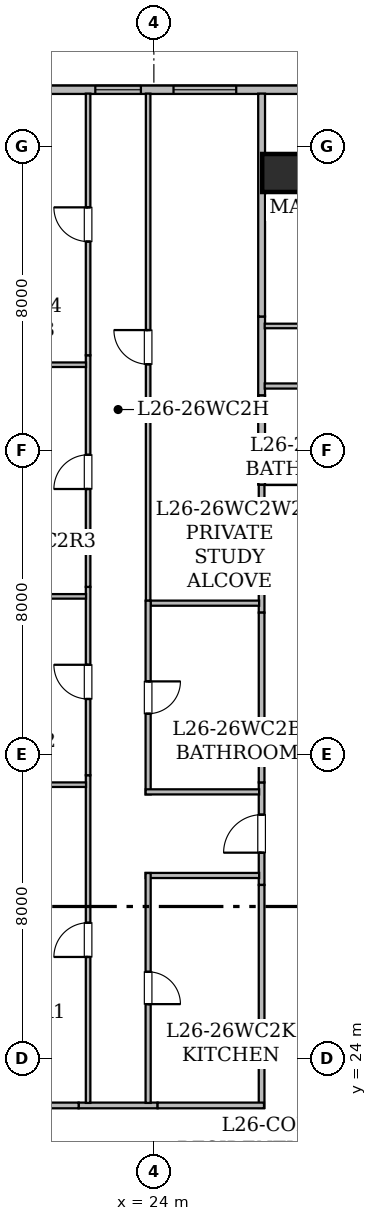
"""IFC4 building model, lengths in metres.
Left out: names, types, materials, properties, quantities, classifications, styles, units other than length and angle.
Written with IfcOpenShell. Run it as: python <this file> out.ifc"""

import sys

from ifc_helpers import new_model, si_unit, direction, frame, frame_2d, origin, origin_2d, place, context, subcontext, project, spatial, rectangle, hollow_rectangle, extrude, element, fill, save


model = new_model("IFC4")
c1 = context("Model", 3, precision=1e-05, world=origin(), true_north=direction((0.0, 1.0)))
c2 = subcontext(c1, "Body", "Model", "MODEL_VIEW")
j1 = project(units=[si_unit("LENGTHUNIT", "METRE"), si_unit("PLANEANGLEUNIT", "RADIAN")], contexts=[c1])
p1 = place(None, origin())
s1 = spatial("IfcSite", under=j1, at=p1, CompositionType="ELEMENT")
p2 = place(p1, origin())
s2 = spatial("IfcBuilding", under=s1, at=p2, CompositionType="ELEMENT")
p3 = place(p2, frame((0.0, 0.0, 105.55)))
s3 = spatial("IfcBuildingStorey", under=s2, at=p3, CompositionType="ELEMENT", Elevation=105.55)
p4 = place(p3, frame((27.35, 47.3, 0.0), z_axis=(0.0, 0.0, 1.0), x_axis=(1.0, 0.0, 0.0)))
e1 = element("IfcColumn", 1, at=p4, inside=s3, PredefinedType="COLUMN", context=c2, shape_type="SweptSolid", body=[
    extrude(hollow_rectangle(XDim=1.0, YDim=1.0, WallThickness=0.05, at=origin_2d()), origin(), (0.0, 0.0, 1.0), 3.65),
])
p5 = place(p3, frame((13.715, 49.49, 0.0), z_axis=(0.0, 0.0, 1.0), x_axis=(1.0, 0.0, 0.0)))
e2 = element("IfcWall", 2, at=p5, inside=s3, PredefinedType="STANDARD", context=c2, shape_type="SweptSolid", body=[
    extrude(rectangle(XDim=38.639, YDim=0.22, at=frame_2d((19.319, 0.0))), origin(), (0.0, 0.0, 1.0), 3.43),
])
p6 = place(p5, frame((1.435, 0.0, 0.85)))
e3 = element("IfcOpeningElement", 3, at=p6, cuts=e2, PredefinedType="OPENING", context=c2, shape_type="SweptSolid", body=[
    extrude(rectangle(XDim=1.65, YDim=1.55, at=frame_2d((0.825, 0.775))), frame((0.0, 0.12, 0.0), z_axis=(0.0, -1.0, 0.0), x_axis=(1.0, 0.0, 0.0)), (0.0, 0.0, 1.0), 0.24),
])
p7 = place(p5, frame((10.802, 0.0, 0.85)))
e4 = element("IfcOpeningElement", 4, at=p7, cuts=e2, PredefinedType="OPENING", context=c2, shape_type="SweptSolid", body=[
    extrude(rectangle(XDim=1.65, YDim=1.55, at=frame_2d((0.825, 0.775))), frame((0.0, 0.12, 0.0), z_axis=(0.0, -1.0, 0.0), x_axis=(1.0, 0.0, 0.0)), (0.0, 0.0, 1.0), 0.24),
])
p8 = place(p5, frame((8.744, 0.0, 0.8)))
e5 = element("IfcOpeningElement", 5, at=p8, cuts=e2, PredefinedType="OPENING", context=c2, shape_type="SweptSolid", body=[
    extrude(rectangle(XDim=1.2, YDim=1.5, at=frame_2d((0.6, 0.75))), frame((0.0, 0.12, 0.0), z_axis=(0.0, -1.0, 0.0), x_axis=(1.0, 0.0, 0.0)), (0.0, 0.0, 1.0), 0.24),
])
p9 = place(p5, frame((5.319, 0.0, 0.85)))
e6 = element("IfcOpeningElement", 6, at=p9, cuts=e2, PredefinedType="OPENING", context=c2, shape_type="SweptSolid", body=[
    extrude(rectangle(XDim=1.65, YDim=1.55, at=frame_2d((0.825, 0.775))), frame((0.0, 0.12, 0.0), z_axis=(0.0, -1.0, 0.0), x_axis=(1.0, 0.0, 0.0)), (0.0, 0.0, 1.0), 0.24),
])
p10 = place(p5, frame((15.665, 0.0, 0.85)))
e7 = element("IfcOpeningElement", 7, at=p10, cuts=e2, PredefinedType="OPENING", context=c2, shape_type="SweptSolid", body=[
    extrude(rectangle(XDim=1.65, YDim=1.55, at=frame_2d((0.825, 0.775))), frame((0.0, 0.12, 0.0), z_axis=(0.0, -1.0, 0.0), x_axis=(1.0, 0.0, 0.0)), (0.0, 0.0, 1.0), 0.24),
])
p11 = place(p5, frame((22.93, 0.0, 0.85)))
e8 = element("IfcOpeningElement", 8, at=p11, cuts=e2, PredefinedType="OPENING", context=c2, shape_type="SweptSolid", body=[
    extrude(rectangle(XDim=1.65, YDim=1.55, at=frame_2d((0.825, 0.775))), frame((0.0, 0.12, 0.0), z_axis=(0.0, -1.0, 0.0), x_axis=(1.0, 0.0, 0.0)), (0.0, 0.0, 1.0), 0.24),
])
p12 = place(p5, frame((30.23, 0.0, 0.85)))
e9 = element("IfcOpeningElement", 9, at=p12, cuts=e2, PredefinedType="OPENING", context=c2, shape_type="SweptSolid", body=[
    extrude(rectangle(XDim=1.65, YDim=1.55, at=frame_2d((0.825, 0.775))), frame((0.0, 0.12, 0.0), z_axis=(0.0, -1.0, 0.0), x_axis=(1.0, 0.0, 0.0)), (0.0, 0.0, 1.0), 0.24),
])
p13 = place(p5, frame((36.367, 0.0, 0.85)))
e10 = element("IfcOpeningElement", 10, at=p13, cuts=e2, PredefinedType="OPENING", context=c2, shape_type="SweptSolid", body=[
    extrude(rectangle(XDim=1.65, YDim=1.55, at=frame_2d((0.825, 0.775))), frame((0.0, 0.12, 0.0), z_axis=(0.0, -1.0, 0.0), x_axis=(1.0, 0.0, 0.0)), (0.0, 0.0, 1.0), 0.24),
])
p14 = place(p3, frame((26.835, 35.732, 0.0), z_axis=(0.0, 0.0, 1.0), x_axis=(0.0, 1.0, 0.0)))
e11 = element("IfcWall", 11, at=p14, inside=s3, PredefinedType="STANDARD", context=c2, shape_type="SweptSolid", body=[
    extrude(rectangle(XDim=3.368, YDim=0.15, at=frame_2d((1.684, 0.0))), origin(), (0.0, 0.0, 1.0), 2.647),
])
p15 = place(p3, frame((26.835, 28.567, 0.0), z_axis=(0.0, 0.0, 1.0), x_axis=(0.0, 1.0, 0.0)))
e12 = element("IfcWall", 12, at=p15, inside=s3, PredefinedType="STANDARD", context=c2, shape_type="SweptSolid", body=[
    extrude(rectangle(XDim=2.698, YDim=0.15, at=frame_2d((1.349, 0.0))), origin(), (0.0, 0.0, 1.0), 3.43),
])
p16 = place(p15, frame((0.849, 0.0, 0.0)))
e13 = element("IfcOpeningElement", 13, at=p16, cuts=e12, PredefinedType="OPENING", context=c2, shape_type="SweptSolid", body=[
    extrude(rectangle(XDim=1.0, YDim=2.15, at=frame_2d((0.5, 1.075))), frame((0.0, 0.085, 0.0), z_axis=(0.0, -1.0, 0.0), x_axis=(1.0, 0.0, 0.0)), (0.0, 0.0, 1.0), 0.17),
])
p17 = place(p3, frame((22.02, 22.765, 0.0), z_axis=(0.0, 0.0, 1.0), x_axis=(1.0, 0.0, 0.0)))
e14 = element("IfcWall", 14, at=p17, inside=s3, PredefinedType="STANDARD", context=c2, shape_type="SweptSolid", body=[
    extrude(rectangle(XDim=2.078, YDim=0.15, at=frame_2d((1.039, 0.0))), origin(), (0.0, 0.0, 1.0), 3.43),
])
p18 = place(p3, frame((26.835, 31.265, 0.0), z_axis=(0.0, 0.0, 1.0), x_axis=(0.0, 1.0, 0.0)))
e15 = element("IfcWall", 15, at=p18, inside=s3, PredefinedType="STANDARD", context=c2, shape_type="SweptSolid", body=[
    extrude(rectangle(XDim=4.467, YDim=0.15, at=frame_2d((2.233, 0.0))), origin(), (0.0, 0.0, 1.0), 3.43),
])
p19 = place(p3, frame((26.835, 22.7, 0.0), z_axis=(0.0, 0.0, 1.0), x_axis=(0.0, 1.0, 0.0)))
e16 = element("IfcWall", 16, at=p19, inside=s3, PredefinedType="STANDARD", context=c2, shape_type="SweptSolid", body=[
    extrude(rectangle(XDim=5.867, YDim=0.15, at=frame_2d((2.934, 0.0))), origin(), (0.0, 0.0, 1.0), 2.961),
])
p20 = place(p3, frame((24.098, 22.765, 0.0), z_axis=(0.0, 0.0, 1.0), x_axis=(1.0, 0.0, 0.0)))
e17 = element("IfcWall", 17, at=p20, inside=s3, PredefinedType="STANDARD", context=c2, shape_type="SweptSolid", body=[
    extrude(rectangle(XDim=2.8, YDim=0.15, at=frame_2d((1.4, 0.0))), origin(), (0.0, 0.0, 1.0), 3.43),
])
p21 = place(p3, frame((17.699, 22.765, 0.0), z_axis=(0.0, 0.0, 1.0), x_axis=(1.0, 0.0, 0.0)))
e18 = element("IfcWall", 18, at=p21, inside=s3, PredefinedType="STANDARD", context=c2, shape_type="SweptSolid", body=[
    extrude(rectangle(XDim=4.321, YDim=0.15, at=frame_2d((2.161, 0.0))), origin(), (0.0, 0.0, 1.0), 2.647),
])
p22 = place(p3, frame((26.9, 39.165, 0.0), z_axis=(0.0, 0.0, 1.0), x_axis=(1.0, 0.0, 0.0)))
e19 = element("IfcWall", 19, at=p22, inside=s3, PredefinedType="STANDARD", context=c2, shape_type="SweptSolid", body=[
    extrude(rectangle(XDim=4.701, YDim=0.15, at=frame_2d((2.351, 0.0))), origin(), (0.0, 0.0, 1.0), 2.647),
])
p23 = place(p3, frame((23.849, 36.046, 0.0), z_axis=(0.0, 0.0, 1.0), x_axis=(0.0, 1.0, 0.0)))
e20 = element("IfcWall", 20, at=p23, inside=s3, PredefinedType="PARTITIONING", context=c2, shape_type="SweptSolid", body=[
    extrude(rectangle(XDim=13.342, YDim=0.12, at=frame_2d((6.671, 0.0))), origin(), (0.0, 0.0, 1.0), 2.647),
])
p24 = place(p23, frame((6.221, 0.0, 0.0)))
e21 = element("IfcOpeningElement", 21, at=p24, cuts=e20, PredefinedType="OPENING", context=c2, shape_type="SweptSolid", body=[
    extrude(rectangle(XDim=0.9, YDim=2.1, at=frame_2d((0.45, 1.05))), frame((0.0, 0.07, 0.0), z_axis=(0.0, -1.0, 0.0), x_axis=(1.0, 0.0, 0.0)), (0.0, 0.0, 1.0), 0.14),
])
p25 = place(p3, frame((26.77, 35.981, 0.0), z_axis=(0.0, 0.0, 1.0), x_axis=(-1.0, 0.0, 0.0)))
e22 = element("IfcWall", 22, at=p25, inside=s3, PredefinedType="PARTITIONING", context=c2, shape_type="SweptSolid", body=[
    extrude(rectangle(XDim=2.856, YDim=0.135, at=frame_2d((1.428, 0.0))), origin(), (0.0, 0.0, 1.0), 3.43),
])
p26 = place(p3, frame((26.835, 43.524, 0.0), z_axis=(0.0, 0.0, 1.0), x_axis=(0.0, -1.0, 0.0)))
e23 = element("IfcWall", 23, at=p26, inside=s3, PredefinedType="STANDARD", context=c2, shape_type="SweptSolid", body=[
    extrude(rectangle(XDim=2.078, YDim=0.18, at=frame_2d((1.039, 0.0))), origin(), (0.0, 0.0, 1.0), 3.43),
])
p27 = place(p3, frame((26.835, 41.446, 0.0), z_axis=(0.0, 0.0, 1.0), x_axis=(0.0, -1.0, 0.0)))
e24 = element("IfcWall", 24, at=p27, inside=s3, PredefinedType="STANDARD", context=c2, shape_type="SweptSolid", body=[
    extrude(rectangle(XDim=2.346, YDim=0.18, at=frame_2d((1.173, 0.0))), origin(), (0.0, 0.0, 1.0), 3.43),
])
p28 = place(p3, frame((26.835, 49.388, 0.0), z_axis=(0.0, 0.0, 1.0), x_axis=(0.0, -1.0, 0.0)))
e25 = element("IfcWall", 25, at=p28, inside=s3, PredefinedType="STANDARD", context=c2, shape_type="SweptSolid", body=[
    extrude(rectangle(XDim=5.864, YDim=0.18, at=frame_2d((2.932, 0.0))), origin(), (0.0, 0.0, 1.0), 2.876),
])
p29 = place(p3, frame((23.849, 36.046, 0.0), z_axis=(0.0, 0.0, 1.0), x_axis=(0.0, -1.0, 0.0)))
e26 = element("IfcWall", 26, at=p29, inside=s3, PredefinedType="PARTITIONING", context=c2, shape_type="SweptSolid", body=[
    extrude(rectangle(XDim=5.095, YDim=0.135, at=frame_2d((2.547, 0.0))), origin(), (0.0, 0.0, 1.0), 3.43),
])
p30 = place(p29, frame((2.123, 0.0, 0.0)))
e27 = element("IfcOpeningElement", 27, at=p30, cuts=e26, PredefinedType="OPENING", context=c2, shape_type="SweptSolid", body=[
    extrude(rectangle(XDim=0.85, YDim=2.1, at=frame_2d((0.425, 1.05))), frame((0.0, 0.077, 0.0), z_axis=(0.0, -1.0, 0.0), x_axis=(1.0, 0.0, 0.0)), (0.0, 0.0, 1.0), 0.155),
])
for number, where, z_axis, x_axis in (
    (28, (23.784, 31.016, 0.0), (0.0, 0.0, 1.0), (1.0, 0.0, 0.0)),
    (29, (26.77, 28.816, 0.0), (0.0, 0.0, 1.0), (-1.0, 0.0, 0.0)),
):
    element("IfcWall", number, at=place(p3, frame(where, z_axis=z_axis, x_axis=x_axis)), inside=s3, PredefinedType="PARTITIONING", context=c2, shape_type="SweptSolid", body=[
        extrude(rectangle(XDim=2.986, YDim=0.135, at=frame_2d((1.493, 0.0))), origin(), (0.0, 0.0, 1.0), 3.43),
    ])
p31 = place(p3, frame((23.849, 28.881, 0.0), z_axis=(0.0, 0.0, 1.0), x_axis=(0.0, -1.0, 0.0)))
e30 = element("IfcWall", 30, at=p31, inside=s3, PredefinedType="PARTITIONING", context=c2, shape_type="SweptSolid", body=[
    extrude(rectangle(XDim=6.049, YDim=0.135, at=frame_2d((3.024, 0.0))), origin(), (0.0, 0.0, 1.0), 2.961),
])
p32 = place(p31, frame((2.6, 0.0, 0.0)))
e31 = element("IfcOpeningElement", 31, at=p32, cuts=e30, PredefinedType="OPENING", context=c2, shape_type="SweptSolid", body=[
    extrude(rectangle(XDim=0.85, YDim=2.1, at=frame_2d((0.425, 1.05))), frame((0.0, 0.077, 0.0), z_axis=(0.0, -1.0, 0.0), x_axis=(1.0, 0.0, 0.0)), (0.0, 0.0, 1.0), 0.155),
])
p33 = place(p3, frame((22.269, 22.832, 0.0), z_axis=(0.0, 0.0, 1.0), x_axis=(0.0, 1.0, 0.0)))
e32 = element("IfcWall", 32, at=p33, inside=s3, PredefinedType="PARTITIONING", context=c2, shape_type="SweptSolid", body=[
    extrude(rectangle(XDim=8.622, YDim=0.12, at=frame_2d((4.311, 0.0))), origin(), (0.0, 0.0, 1.0), 2.961),
])
p34 = place(p33, frame((3.84, 0.0, 0.0)))
e33 = element("IfcOpeningElement", 33, at=p34, cuts=e32, PredefinedType="OPENING", context=c2, shape_type="SweptSolid", body=[
    extrude(rectangle(XDim=0.9, YDim=2.1, at=frame_2d((0.45, 1.05))), frame((0.0, 0.07, 0.0), z_axis=(0.0, -1.0, 0.0), x_axis=(1.0, 0.0, 0.0)), (0.0, 0.0, 1.0), 0.14),
])
p35 = place(p3, frame((22.269, 31.454, 0.0), z_axis=(0.0, 0.0, 1.0), x_axis=(0.0, 1.0, 0.0)))
e34 = element("IfcWall", 34, at=p35, inside=s3, PredefinedType="PARTITIONING", context=c2, shape_type="SweptSolid", body=[
    extrude(rectangle(XDim=4.955, YDim=0.12, at=frame_2d((2.478, 0.0))), origin(), (0.0, 0.0, 1.0), 3.43),
])
p36 = place(p35, frame((2.006, 0.0, 0.0)))
e35 = element("IfcOpeningElement", 35, at=p36, cuts=e34, PredefinedType="OPENING", context=c2, shape_type="SweptSolid", body=[
    extrude(rectangle(XDim=0.9, YDim=2.1, at=frame_2d((0.45, 1.05))), frame((0.0, 0.07, 0.0), z_axis=(0.0, -1.0, 0.0), x_axis=(1.0, 0.0, 0.0)), (0.0, 0.0, 1.0), 0.14),
])
p37 = place(p3, frame((22.269, 36.409, 0.0), z_axis=(0.0, 0.0, 1.0), x_axis=(0.0, 1.0, 0.0)))
e36 = element("IfcWall", 36, at=p37, inside=s3, PredefinedType="PARTITIONING", context=c2, shape_type="SweptSolid", body=[
    extrude(rectangle(XDim=6.095, YDim=0.12, at=frame_2d((3.047, 0.0))), origin(), (0.0, 0.0, 1.0), 2.647),
])
p38 = place(p37, frame((2.576, 0.0, 0.0)))
e37 = element("IfcOpeningElement", 37, at=p38, cuts=e36, PredefinedType="OPENING", context=c2, shape_type="SweptSolid", body=[
    extrude(rectangle(XDim=0.9, YDim=2.1, at=frame_2d((0.45, 1.05))), frame((0.0, 0.07, 0.0), z_axis=(0.0, -1.0, 0.0), x_axis=(1.0, 0.0, 0.0)), (0.0, 0.0, 1.0), 0.14),
])
p39 = place(p3, frame((22.269, 42.504, 0.0), z_axis=(0.0, 0.0, 1.0), x_axis=(0.0, 1.0, 0.0)))
e38 = element("IfcWall", 38, at=p39, inside=s3, PredefinedType="PARTITIONING", context=c2, shape_type="SweptSolid", body=[
    extrude(rectangle(XDim=6.884, YDim=0.12, at=frame_2d((3.442, 0.0))), origin(), (0.0, 0.0, 1.0), 2.876),
])
p40 = place(p39, frame((2.992, 0.0, 0.0)))
e39 = element("IfcOpeningElement", 39, at=p40, cuts=e38, PredefinedType="OPENING", context=c2, shape_type="SweptSolid", body=[
    extrude(rectangle(XDim=0.9, YDim=2.1, at=frame_2d((0.45, 1.05))), frame((0.0, 0.07, 0.0), z_axis=(0.0, -1.0, 0.0), x_axis=(1.0, 0.0, 0.0)), (0.0, 0.0, 1.0), 0.14),
])
for number, where, z_axis, x_axis in (
    (40, (17.532, 31.205, 0.0), (0.0, 0.0, 1.0), (1.0, 0.0, 0.0)),
    (41, (17.532, 36.16, 0.0), (0.0, 0.0, 1.0), (1.0, 0.0, 0.0)),
):
    element("IfcWall", number, at=place(p3, frame(where, z_axis=z_axis, x_axis=x_axis)), inside=s3, PredefinedType="PARTITIONING", context=c2, shape_type="SweptSolid", body=[
        extrude(rectangle(XDim=4.683, YDim=0.12, at=frame_2d((2.342, 0.0))), origin(), (0.0, 0.0, 1.0), 2.647),
    ])
p41 = place(p3, frame((17.532, 42.255, 0.0), z_axis=(0.0, 0.0, 1.0), x_axis=(1.0, 0.0, 0.0)))
e42 = element("IfcWall", 42, at=p41, inside=s3, PredefinedType="PARTITIONING", context=c2, shape_type="SweptSolid", body=[
    extrude(rectangle(XDim=4.683, YDim=0.12, at=frame_2d((2.342, 0.0))), origin(), (0.0, 0.0, 1.0), 3.43),
])
p42 = place(p3, frame((31.915, 41.695, 0.0), z_axis=(0.0, 0.0, 1.0), x_axis=(-1.0, 0.0, 0.0)))
e43 = element("IfcWall", 43, at=p42, inside=s3, PredefinedType="PARTITIONING", context=c2, shape_type="SweptSolid", body=[
    extrude(rectangle(XDim=4.998, YDim=0.135, at=frame_2d((2.499, 0.0))), origin(), (0.0, 0.0, 1.0), 2.647),
])
p43 = place(p42, frame((2.074, 0.0, 0.0)))
e44 = element("IfcOpeningElement", 44, at=p43, cuts=e43, PredefinedType="OPENING", context=c2, shape_type="SweptSolid", body=[
    extrude(rectangle(XDim=0.85, YDim=2.1, at=frame_2d((0.425, 1.05))), frame((0.0, 0.077, 0.0), z_axis=(0.0, -1.0, 0.0), x_axis=(1.0, 0.0, 0.0)), (0.0, 0.0, 1.0), 0.155),
])
p44 = place(p3, frame((26.917, 43.275, 0.0), z_axis=(0.0, 0.0, 1.0), x_axis=(1.0, 0.0, 0.0)))
e45 = element("IfcWall", 45, at=p44, inside=s3, PredefinedType="PARTITIONING", context=c2, shape_type="SweptSolid", body=[
    extrude(rectangle(XDim=6.906, YDim=0.12, at=frame_2d((3.453, 0.0))), origin(), (0.0, 0.0, 1.0), 2.647),
])
p45 = place(p44, frame((2.982, 0.0, 0.0)))
e46 = element("IfcOpeningElement", 46, at=p45, cuts=e45, PredefinedType="OPENING", context=c2, shape_type="SweptSolid", body=[
    extrude(rectangle(XDim=0.9, YDim=2.1, at=frame_2d((0.45, 1.05))), frame((0.0, 0.07, 0.0), z_axis=(0.0, -1.0, 0.0), x_axis=(1.0, 0.0, 0.0)), (0.0, 0.0, 1.0), 0.14),
])
p46 = place(p7, origin())
e47 = element("IfcWindow", 47, at=p46, inside=s3, PartitioningType="SINGLE_PANEL", PredefinedType="WINDOW", context=c2, shape_type="SweptSolid", body=[
    extrude(rectangle(XDim=1.65, YDim=1.55, at=frame_2d((0.825, 0.775))), frame((0.0, 0.03, 0.0), z_axis=(0.0, -1.0, 0.0), x_axis=(1.0, 0.0, 0.0)), (0.0, 0.0, 1.0), 0.06),
])
fill(e4, e47)
p47 = place(p8, origin())
e48 = element("IfcWindow", 48, at=p47, inside=s3, PartitioningType="SINGLE_PANEL", PredefinedType="WINDOW", context=c2, shape_type="SweptSolid", body=[
    extrude(rectangle(XDim=1.2, YDim=1.5, at=frame_2d((0.6, 0.75))), frame((0.0, 0.03, 0.0), z_axis=(0.0, -1.0, 0.0), x_axis=(1.0, 0.0, 0.0)), (0.0, 0.0, 1.0), 0.06),
])
fill(e5, e48)
p48 = place(p16, origin())
e49 = element("IfcDoor", 49, at=p48, inside=s3, OperationType="SINGLE_SWING_LEFT", PredefinedType="DOOR", context=c2, shape_type="SweptSolid", body=[
    extrude(rectangle(XDim=1.0, YDim=2.15, at=frame_2d((0.5, 1.075))), frame((0.0, 0.025, 0.0), z_axis=(0.0, -1.0, 0.0), x_axis=(1.0, 0.0, 0.0)), (0.0, 0.0, 1.0), 0.05),
])
fill(e13, e49)
p49 = place(p24, origin())
e50 = element("IfcDoor", 50, at=p49, inside=s3, OperationType="SINGLE_SWING_RIGHT", PredefinedType="DOOR", context=c2, shape_type="SweptSolid", body=[
    extrude(rectangle(XDim=0.9, YDim=2.1, at=frame_2d((0.45, 1.05))), frame((0.0, 0.025, 0.0), z_axis=(0.0, -1.0, 0.0), x_axis=(1.0, 0.0, 0.0)), (0.0, 0.0, 1.0), 0.05),
])
fill(e21, e50)
p50 = place(p30, origin())
e51 = element("IfcDoor", 51, at=p50, inside=s3, OperationType="SINGLE_SWING_LEFT", PredefinedType="DOOR", context=c2, shape_type="SweptSolid", body=[
    extrude(rectangle(XDim=0.85, YDim=2.1, at=frame_2d((0.425, 1.05))), frame((0.0, 0.025, 0.0), z_axis=(0.0, -1.0, 0.0), x_axis=(1.0, 0.0, 0.0)), (0.0, 0.0, 1.0), 0.05),
])
fill(e27, e51)
p51 = place(p32, origin())
e52 = element("IfcDoor", 52, at=p51, inside=s3, OperationType="SINGLE_SWING_RIGHT", PredefinedType="DOOR", context=c2, shape_type="SweptSolid", body=[
    extrude(rectangle(XDim=0.85, YDim=2.1, at=frame_2d((0.425, 1.05))), frame((0.0, 0.025, 0.0), z_axis=(0.0, -1.0, 0.0), x_axis=(1.0, 0.0, 0.0)), (0.0, 0.0, 1.0), 0.05),
])
fill(e31, e52)
p52 = place(p34, origin())
e53 = element("IfcDoor", 53, at=p52, inside=s3, OperationType="SINGLE_SWING_LEFT", PredefinedType="DOOR", context=c2, shape_type="SweptSolid", body=[
    extrude(rectangle(XDim=0.9, YDim=2.1, at=frame_2d((0.45, 1.05))), frame((0.0, 0.025, 0.0), z_axis=(0.0, -1.0, 0.0), x_axis=(1.0, 0.0, 0.0)), (0.0, 0.0, 1.0), 0.05),
])
fill(e33, e53)
p53 = place(p36, origin())
e54 = element("IfcDoor", 54, at=p53, inside=s3, OperationType="SINGLE_SWING_RIGHT", PredefinedType="DOOR", context=c2, shape_type="SweptSolid", body=[
    extrude(rectangle(XDim=0.9, YDim=2.1, at=frame_2d((0.45, 1.05))), frame((0.0, 0.025, 0.0), z_axis=(0.0, -1.0, 0.0), x_axis=(1.0, 0.0, 0.0)), (0.0, 0.0, 1.0), 0.05),
])
fill(e35, e54)
p54 = place(p38, origin())
e55 = element("IfcDoor", 55, at=p54, inside=s3, OperationType="SINGLE_SWING_LEFT", PredefinedType="DOOR", context=c2, shape_type="SweptSolid", body=[
    extrude(rectangle(XDim=0.9, YDim=2.1, at=frame_2d((0.45, 1.05))), frame((0.0, 0.025, 0.0), z_axis=(0.0, -1.0, 0.0), x_axis=(1.0, 0.0, 0.0)), (0.0, 0.0, 1.0), 0.05),
])
fill(e37, e55)
p55 = place(p40, origin())
e56 = element("IfcDoor", 56, at=p55, inside=s3, OperationType="SINGLE_SWING_RIGHT", PredefinedType="DOOR", context=c2, shape_type="SweptSolid", body=[
    extrude(rectangle(XDim=0.9, YDim=2.1, at=frame_2d((0.45, 1.05))), frame((0.0, 0.025, 0.0), z_axis=(0.0, -1.0, 0.0), x_axis=(1.0, 0.0, 0.0)), (0.0, 0.0, 1.0), 0.05),
])
fill(e39, e56)
save(model, sys.argv[1])
